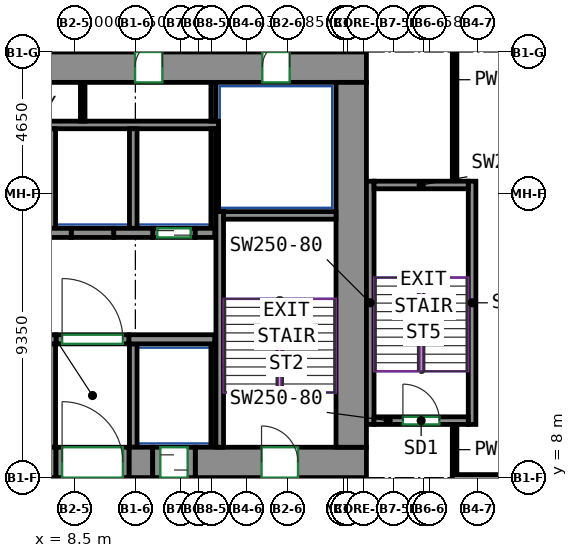
"""IFC4 building model, lengths in metres.
Left out: names, types, materials, properties, quantities, classifications, styles, units other than length and angle.
Written with IfcOpenShell. Run it as: python <this file> out.ifc"""

import sys

from ifc_helpers import new_model, si_unit, direction, frame, frame_2d, origin, place, context, subcontext, project, spatial, rectangle, extrude, source, transform, mapped, element, fill, save


model = new_model("IFC4")
c1 = context("Model", 3, precision=1e-05, world=origin(), true_north=direction((0.0, 1.0)))
c2 = subcontext(c1, "Body", "Model", "MODEL_VIEW")
j1 = project(units=[si_unit("LENGTHUNIT", "METRE"), si_unit("PLANEANGLEUNIT", "RADIAN")], contexts=[c1])
p1 = place(None, origin())
s1 = spatial("IfcSite", under=j1, at=p1, CompositionType="ELEMENT")
p2 = place(p1, origin())
s2 = spatial("IfcBuilding", under=s1, at=p2, CompositionType="ELEMENT")
p3 = place(p2, frame((0.0, 0.0, 27.0)))
s3 = spatial("IfcBuildingStorey", under=s2, at=p3, CompositionType="ELEMENT", Elevation=27.0)
m1 = source(origin(), c2, "Body", "SweptSolid", [
    extrude(rectangle(XDim=14.18, YDim=1.0, at=frame_2d((7.09, 0.0))), origin(), (0.0, 0.0, 1.0), 3.72),
])
p4 = place(p3, frame((-6.29, 8.5, 0.0), z_axis=(0.0, 0.0, 1.0), x_axis=(1.0, 0.0, 0.0)))
e1 = element("IfcWall", 1, at=p4, inside=s3, PredefinedType="SHEAR", context=c2, shape_type="MappedRepresentation", body=[
    mapped(m1, transform((0.0, 0.0, 0.0))),
])
m2 = source(origin(), c2, "Body", "SweptSolid", [
    extrude(rectangle(XDim=0.78, YDim=1.0, at=frame_2d((0.39, 0.0))), origin(), (0.0, 0.0, 1.0), 3.72),
])
p5 = place(p3, frame((10.29, 8.5, 0.0), z_axis=(0.0, 0.0, 1.0), x_axis=(1.0, 0.0, 0.0)))
e2 = element("IfcWall", 2, at=p5, inside=s3, PredefinedType="SHEAR", context=c2, shape_type="MappedRepresentation", body=[
    mapped(m2, transform((0.0, 0.0, 0.0))),
])
m3 = source(origin(), c2, "Body", "SweptSolid", [
    extrude(rectangle(XDim=5.63, YDim=1.0, at=frame_2d((2.815, 0.0))), origin(), (0.0, 0.0, 1.0), 3.72),
])
p6 = place(p3, frame((12.47, 8.5, 0.0), z_axis=(0.0, 0.0, 1.0), x_axis=(1.0, 0.0, 0.0)))
e3 = element("IfcWall", 3, at=p6, inside=s3, PredefinedType="SHEAR", context=c2, shape_type="MappedRepresentation", body=[
    mapped(m3, transform((0.0, 0.0, 0.0))),
])
p7 = place(p6, frame((2.18, 0.0, 0.0)))
e4 = element("IfcOpeningElement", 4, at=p7, cuts=e3, PredefinedType="OPENING", context=c2, shape_type="SweptSolid", body=[
    extrude(rectangle(XDim=1.2, YDim=2.1, at=frame_2d((0.6, 1.05))), frame((0.0, 0.51, 0.0), z_axis=(0.0, -1.0, 0.0), x_axis=(1.0, 0.0, 0.0)), (0.0, 0.0, 1.0), 1.02),
])
m4 = source(origin(), c2, "Body", "SweptSolid", [
    extrude(rectangle(XDim=34.1, YDim=1.0, at=frame_2d((17.05, 0.0))), origin(), (0.0, 0.0, 1.0), 3.72),
])
p8 = place(p3, frame((-16.0, 21.5, 0.0), z_axis=(0.0, 0.0, 1.0), x_axis=(1.0, 0.0, 0.0)))
e5 = element("IfcWall", 5, at=p8, inside=s3, PredefinedType="SHEAR", context=c2, shape_type="MappedRepresentation", body=[
    mapped(m4, transform((0.0, 0.0, 0.0))),
])
p9 = place(p8, frame((6.108, 0.0, 0.0)))
e6 = element("IfcOpeningElement", 6, at=p9, cuts=e5, PredefinedType="OPENING", context=c2, shape_type="SweptSolid", body=[
    extrude(rectangle(XDim=0.9, YDim=2.1, at=frame_2d((0.45, 1.05))), frame((0.0, 0.51, 0.0), z_axis=(0.0, -1.0, 0.0), x_axis=(1.0, 0.0, 0.0)), (0.0, 0.0, 1.0), 1.02),
])
p10 = place(p8, frame((11.173, 0.0, 0.0)))
e7 = element("IfcOpeningElement", 7, at=p10, cuts=e5, PredefinedType="OPENING", context=c2, shape_type="SweptSolid", body=[
    extrude(rectangle(XDim=0.9, YDim=2.1, at=frame_2d((0.45, 1.05))), frame((0.0, 0.51, 0.0), z_axis=(0.0, -1.0, 0.0), x_axis=(1.0, 0.0, 0.0)), (0.0, 0.0, 1.0), 1.02),
])
p11 = place(p8, frame((16.238, 0.0, 0.0)))
e8 = element("IfcOpeningElement", 8, at=p11, cuts=e5, PredefinedType="OPENING", context=c2, shape_type="SweptSolid", body=[
    extrude(rectangle(XDim=0.9, YDim=2.1, at=frame_2d((0.45, 1.05))), frame((0.0, 0.51, 0.0), z_axis=(0.0, -1.0, 0.0), x_axis=(1.0, 0.0, 0.0)), (0.0, 0.0, 1.0), 1.02),
])
p12 = place(p8, frame((21.062, 0.0, 0.0)))
e9 = element("IfcOpeningElement", 9, at=p12, cuts=e5, PredefinedType="OPENING", context=c2, shape_type="SweptSolid", body=[
    extrude(rectangle(XDim=0.9, YDim=2.1, at=frame_2d((0.45, 1.05))), frame((0.0, 0.51, 0.0), z_axis=(0.0, -1.0, 0.0), x_axis=(1.0, 0.0, 0.0)), (0.0, 0.0, 1.0), 1.02),
])
p13 = place(p8, frame((26.489, 0.0, 0.0)))
e10 = element("IfcOpeningElement", 10, at=p13, cuts=e5, PredefinedType="OPENING", context=c2, shape_type="SweptSolid", body=[
    extrude(rectangle(XDim=0.9, YDim=2.1, at=frame_2d((0.45, 1.05))), frame((0.0, 0.51, 0.0), z_axis=(0.0, -1.0, 0.0), x_axis=(1.0, 0.0, 0.0)), (0.0, 0.0, 1.0), 1.02),
])
p14 = place(p8, frame((2.525, 0.0, 0.0)))
e11 = element("IfcOpeningElement", 11, at=p14, cuts=e5, PredefinedType="OPENING", context=c2, shape_type="SweptSolid", body=[
    extrude(rectangle(XDim=0.9, YDim=2.1, at=frame_2d((0.45, 1.05))), frame((0.0, 0.51, 0.0), z_axis=(0.0, -1.0, 0.0), x_axis=(1.0, 0.0, 0.0)), (0.0, 0.0, 1.0), 1.02),
])
p15 = place(p8, frame((30.675, 0.0, 0.0)))
e12 = element("IfcOpeningElement", 12, at=p15, cuts=e5, PredefinedType="OPENING", context=c2, shape_type="SweptSolid", body=[
    extrude(rectangle(XDim=0.9, YDim=2.1, at=frame_2d((0.45, 1.05))), frame((0.0, 0.51, 0.0), z_axis=(0.0, -1.0, 0.0), x_axis=(1.0, 0.0, 0.0)), (0.0, 0.0, 1.0), 1.02),
])
m5 = source(origin(), c2, "Body", "SweptSolid", [
    extrude(rectangle(XDim=12.0, YDim=1.0, at=frame_2d((6.0, 0.0))), origin(), (0.0, 0.0, 1.0), 3.72),
])
p16 = place(p3, frame((17.6, 9.0, 0.0), z_axis=(0.0, 0.0, 1.0), x_axis=(0.0, 1.0, 0.0)))
e13 = element("IfcWall", 13, at=p16, inside=s3, PredefinedType="SHEAR", context=c2, shape_type="MappedRepresentation", body=[
    mapped(m5, transform((0.0, 0.0, 0.0))),
])
m6 = source(origin(), c2, "Body", "SweptSolid", [
    extrude(rectangle(XDim=7.75, YDim=0.25, at=frame_2d((3.875, 0.0))), origin(), (0.0, 0.0, 1.0), 3.72),
])
p17 = place(p3, frame((13.275, 9.0, 0.0), z_axis=(0.0, 0.0, 1.0), x_axis=(0.0, 1.0, 0.0)))
e14 = element("IfcWall", 14, at=p17, inside=s3, PredefinedType="SHEAR", context=c2, shape_type="MappedRepresentation", body=[
    mapped(m6, transform((0.0, 0.0, 0.0))),
])
m7 = source(origin(), c2, "Body", "SweptSolid", [
    extrude(rectangle(XDim=3.7, YDim=0.25, at=frame_2d((1.85, 0.0))), origin(), (0.0, 0.0, 1.0), 3.72),
])
p18 = place(p3, frame((13.4, 16.625, 0.0), z_axis=(0.0, 0.0, 1.0), x_axis=(1.0, 0.0, 0.0)))
e15 = element("IfcWall", 15, at=p18, inside=s3, PredefinedType="SHEAR", context=c2, shape_type="MappedRepresentation", body=[
    mapped(m7, transform((0.0, 0.0, 0.0))),
])
m8 = source(origin(), c2, "Body", "SweptSolid", [
    extrude(rectangle(XDim=8.0, YDim=0.25, at=frame_2d((4.0, 0.0))), origin(), (0.0, 0.0, 1.0), 3.72),
])
for number, where, z_axis, x_axis in (
    (16, (18.225, 9.75, 0.0), (0.0, 0.0, 1.0), (0.0, 1.0, 0.0)),
    (17, (21.575, 9.75, 0.0), (0.0, 0.0, 1.0), (0.0, 1.0, 0.0)),
):
    element("IfcWall", number, at=place(p3, frame(where, z_axis=z_axis, x_axis=x_axis)), inside=s3, PredefinedType="SHEAR", context=c2, shape_type="MappedRepresentation", body=[
        mapped(m8, transform((0.0, 0.0, 0.0))),
    ])
m9 = source(origin(), c2, "Body", "SweptSolid", [
    extrude(rectangle(XDim=3.1, YDim=0.25, at=frame_2d((1.55, 0.0))), origin(), (0.0, 0.0, 1.0), 3.72),
])
p19 = place(p3, frame((18.35, 9.875, 0.0), z_axis=(0.0, 0.0, 1.0), x_axis=(1.0, 0.0, 0.0)))
e18 = element("IfcWall", 18, at=p19, inside=s3, PredefinedType="SHEAR", context=c2, shape_type="MappedRepresentation", body=[
    mapped(m9, transform((0.0, 0.0, 0.0))),
])
p20 = place(p19, frame((0.95, 0.0, 0.0)))
e19 = element("IfcOpeningElement", 19, at=p20, cuts=e18, PredefinedType="OPENING", context=c2, shape_type="SweptSolid", body=[
    extrude(rectangle(XDim=1.2, YDim=2.1, at=frame_2d((0.6, 1.05))), frame((0.0, 0.135, 0.0), z_axis=(0.0, -1.0, 0.0), x_axis=(1.0, 0.0, 0.0)), (0.0, 0.0, 1.0), 0.27),
])
p21 = place(p3, frame((18.35, 17.625, 0.0), z_axis=(0.0, 0.0, 1.0), x_axis=(1.0, 0.0, 0.0)))
e20 = element("IfcWall", 20, at=p21, inside=s3, PredefinedType="SHEAR", context=c2, shape_type="MappedRepresentation", body=[
    mapped(m9, transform((0.0, 0.0, 0.0))),
])
m10 = source(origin(), c2, "Body", "SweptSolid", [
    extrude(rectangle(XDim=0.78, YDim=0.3, at=frame_2d((0.39, 0.0))), origin(), (0.0, 0.0, 1.0), 3.72),
])
p22 = place(p3, frame((7.11, 12.55, 0.0), z_axis=(0.0, 0.0, 1.0), x_axis=(1.0, 0.0, 0.0)))
e21 = element("IfcWall", 21, at=p22, inside=s3, PredefinedType="SHEAR", context=c2, shape_type="MappedRepresentation", body=[
    mapped(m10, transform((0.0, 0.0, 0.0))),
])
m11 = source(origin(), c2, "Body", "SweptSolid", [
    extrude(rectangle(XDim=2.82, YDim=0.3, at=frame_2d((1.41, 0.0))), origin(), (0.0, 0.0, 1.0), 3.72),
])
p23 = place(p3, frame((10.29, 12.55, 0.0), z_axis=(0.0, 0.0, 1.0), x_axis=(1.0, 0.0, 0.0)))
e22 = element("IfcWall", 22, at=p23, inside=s3, PredefinedType="SHEAR", context=c2, shape_type="MappedRepresentation", body=[
    mapped(m11, transform((0.0, 0.0, 0.0))),
])
m12 = source(origin(), c2, "Body", "SweptSolid", [
    extrude(rectangle(XDim=1.28, YDim=0.3, at=frame_2d((0.64, 0.0))), origin(), (0.0, 0.0, 1.0), 3.72),
])
p24 = place(p3, frame((7.11, 16.05, 0.0), z_axis=(0.0, 0.0, 1.0), x_axis=(1.0, 0.0, 0.0)))
e23 = element("IfcWall", 23, at=p24, inside=s3, PredefinedType="SHEAR", context=c2, shape_type="MappedRepresentation", body=[
    mapped(m12, transform((0.0, 0.0, 0.0))),
])
m13 = source(origin(), c2, "Body", "SweptSolid", [
    extrude(rectangle(XDim=1.28, YDim=0.3, at=frame_2d((0.64, 0.0))), origin(), (0.0, 0.0, 1.0), 3.72),
])
p25 = place(p3, frame((9.79, 16.05, 0.0), z_axis=(0.0, 0.0, 1.0), x_axis=(1.0, 0.0, 0.0)))
e24 = element("IfcWall", 24, at=p25, inside=s3, PredefinedType="SHEAR", context=c2, shape_type="MappedRepresentation", body=[
    mapped(m13, transform((0.0, 0.0, 0.0))),
])
m14 = source(origin(), c2, "Body", "SweptSolid", [
    extrude(rectangle(XDim=0.64, YDim=0.3, at=frame_2d((0.32, 0.0))), origin(), (0.0, 0.0, 1.0), 3.72),
])
p26 = place(p3, frame((12.47, 16.05, 0.0), z_axis=(0.0, 0.0, 1.0), x_axis=(1.0, 0.0, 0.0)))
e25 = element("IfcWall", 25, at=p26, inside=s3, PredefinedType="SHEAR", context=c2, shape_type="MappedRepresentation", body=[
    mapped(m14, transform((0.0, 0.0, 0.0))),
])
m15 = source(origin(), c2, "Body", "SweptSolid", [
    extrude(rectangle(XDim=1.4, YDim=0.3, at=frame_2d((0.7, 0.0))), origin(), (0.0, 0.0, 1.0), 3.72),
])
p27 = place(p3, frame((11.07, 16.05, 0.0), z_axis=(0.0, 0.0, 1.0), x_axis=(1.0, 0.0, 0.0)))
e26 = element("IfcWall", 26, at=p27, inside=s3, PredefinedType="PARTITIONING", context=c2, shape_type="MappedRepresentation", body=[
    mapped(m15, transform((0.0, 0.0, 0.0))),
])
p28 = place(p27, frame((0.15, 0.0, 0.0)))
e27 = element("IfcOpeningElement", 27, at=p28, cuts=e26, PredefinedType="OPENING", context=c2, shape_type="SweptSolid", body=[
    extrude(rectangle(XDim=1.1, YDim=2.1, at=frame_2d((0.55, 1.05))), frame((0.0, 0.16, 0.0), z_axis=(0.0, -1.0, 0.0), x_axis=(1.0, 0.0, 0.0)), (0.0, 0.0, 1.0), 0.32),
])
m16 = source(origin(), c2, "Body", "SweptSolid", [
    extrude(rectangle(XDim=2.4, YDim=0.3, at=frame_2d((1.2, 0.0))), origin(), (0.0, 0.0, 1.0), 3.72),
])
p29 = place(p3, frame((7.89, 12.55, 0.0), z_axis=(0.0, 0.0, 1.0), x_axis=(1.0, 0.0, 0.0)))
e28 = element("IfcWall", 28, at=p29, inside=s3, PredefinedType="PARTITIONING", context=c2, shape_type="MappedRepresentation", body=[
    mapped(m16, transform((0.0, 0.0, 0.0))),
])
p30 = place(p29, frame((0.2, 0.0, 0.0)))
e29 = element("IfcOpeningElement", 29, at=p30, cuts=e28, PredefinedType="OPENING", context=c2, shape_type="SweptSolid", body=[
    extrude(rectangle(XDim=2.0, YDim=2.1, at=frame_2d((1.0, 1.05))), frame((0.0, 0.16, 0.0), z_axis=(0.0, -1.0, 0.0), x_axis=(1.0, 0.0, 0.0)), (0.0, 0.0, 1.0), 0.32),
])
m17 = source(origin(), c2, "Body", "SweptSolid", [
    extrude(rectangle(XDim=1.4, YDim=0.3, at=frame_2d((0.7, 0.0))), origin(), (0.0, 0.0, 1.0), 3.72),
])
p31 = place(p3, frame((8.39, 16.05, 0.0), z_axis=(0.0, 0.0, 1.0), x_axis=(1.0, 0.0, 0.0)))
e30 = element("IfcWall", 30, at=p31, inside=s3, PredefinedType="PARTITIONING", context=c2, shape_type="MappedRepresentation", body=[
    mapped(m17, transform((0.0, 0.0, 0.0))),
])
m18 = source(origin(), c2, "Body", "SweptSolid", [
    extrude(rectangle(XDim=24.37, YDim=0.25, at=frame_2d((12.185, 0.0))), origin(), (0.0, 0.0, 1.0), 3.72),
])
p32 = place(p3, frame((-11.135, 19.6, 0.0), z_axis=(0.0, 0.0, 1.0), x_axis=(1.0, 0.0, 0.0)))
e31 = element("IfcWall", 31, at=p32, inside=s3, PredefinedType="PARTITIONING", context=c2, shape_type="MappedRepresentation", body=[
    mapped(m18, transform((0.0, 0.0, 0.0))),
])
m19 = source(origin(), c2, "Body", "SweptSolid", [
    extrude(rectangle(XDim=3.275, YDim=0.165, at=frame_2d((1.638, 0.0))), origin(), (0.0, 0.0, 1.0), 3.72),
])
p33 = place(p3, frame((13.067, 16.2, 0.0), z_axis=(0.0, 0.0, 1.0), x_axis=(0.0, 1.0, 0.0)))
e32 = element("IfcWall", 32, at=p33, inside=s3, PredefinedType="PARTITIONING", context=c2, shape_type="MappedRepresentation", body=[
    mapped(m19, transform((0.0, 0.0, 0.0))),
])
m20 = source(origin(), c2, "Body", "SweptSolid", [
    extrude(rectangle(XDim=1.275, YDim=0.165, at=frame_2d((0.637, 0.0))), origin(), (0.0, 0.0, 1.0), 3.72),
])
p34 = place(p3, frame((13.067, 19.725, 0.0), z_axis=(0.0, 0.0, 1.0), x_axis=(0.0, 1.0, 0.0)))
e33 = element("IfcWall", 33, at=p34, inside=s3, PredefinedType="PARTITIONING", context=c2, shape_type="MappedRepresentation", body=[
    mapped(m20, transform((0.0, 0.0, 0.0))),
])
m21 = source(origin(), c2, "Body", "SweptSolid", [
    extrude(rectangle(XDim=3.275, YDim=0.25, at=frame_2d((1.638, 0.0))), origin(), (0.0, 0.0, 1.0), 3.72),
])
p35 = place(p3, frame((10.43, 16.2, 0.0), z_axis=(0.0, 0.0, 1.0), x_axis=(0.0, 1.0, 0.0)))
e34 = element("IfcWall", 34, at=p35, inside=s3, PredefinedType="PARTITIONING", context=c2, shape_type="MappedRepresentation", body=[
    mapped(m21, transform((0.0, 0.0, 0.0))),
])
m22 = source(origin(), c2, "Body", "SweptSolid", [
    extrude(rectangle(XDim=2.725, YDim=0.085, at=frame_2d((1.363, 0.0))), origin(), (0.0, 0.0, 1.0), 3.72),
])
p36 = place(p3, frame((13.192, 16.75, 0.0), z_axis=(0.0, 0.0, 1.0), x_axis=(0.0, 1.0, 0.0)))
e35 = element("IfcWall", 35, at=p36, inside=s3, PredefinedType="PARTITIONING", context=c2, shape_type="MappedRepresentation", body=[
    mapped(m22, transform((0.0, 0.0, 0.0))),
])
p37 = place(p3, frame((7.75, 16.2, 0.0), z_axis=(0.0, 0.0, 1.0), x_axis=(0.0, 1.0, 0.0)))
e36 = element("IfcWall", 36, at=p37, inside=s3, PredefinedType="PARTITIONING", context=c2, shape_type="MappedRepresentation", body=[
    mapped(m21, transform((0.0, 0.0, 0.0))),
])
m23 = source(origin(), c2, "Body", "SweptSolid", [
    extrude(rectangle(XDim=3.4, YDim=0.25, at=frame_2d((1.7, 0.0))), origin(), (0.0, 0.0, 1.0), 3.72),
])
p38 = place(p3, frame((10.43, 9.0, 0.0), z_axis=(0.0, 0.0, 1.0), x_axis=(0.0, 1.0, 0.0)))
e37 = element("IfcWall", 37, at=p38, inside=s3, PredefinedType="PARTITIONING", context=c2, shape_type="MappedRepresentation", body=[
    mapped(m23, transform((0.0, 0.0, 0.0))),
])
m24 = source(origin(), c2, "Body", "SweptSolid", [
    extrude(rectangle(XDim=3.4, YDim=0.165, at=frame_2d((1.7, 0.0))), origin(), (0.0, 0.0, 1.0), 3.72),
])
p39 = place(p3, frame((13.067, 9.0, 0.0), z_axis=(0.0, 0.0, 1.0), x_axis=(0.0, 1.0, 0.0)))
e38 = element("IfcWall", 38, at=p39, inside=s3, PredefinedType="PARTITIONING", context=c2, shape_type="MappedRepresentation", body=[
    mapped(m24, transform((0.0, 0.0, 0.0))),
])
p40 = place(p3, frame((7.75, 9.0, 0.0), z_axis=(0.0, 0.0, 1.0), x_axis=(0.0, 1.0, 0.0)))
e39 = element("IfcWall", 39, at=p40, inside=s3, PredefinedType="PARTITIONING", context=c2, shape_type="MappedRepresentation", body=[
    mapped(m23, transform((0.0, 0.0, 0.0))),
])
m25 = source(origin(), c2, "Body", "SweptSolid", [
    extrude(rectangle(XDim=1.275, YDim=0.15, at=frame_2d((0.637, 0.0))), origin(), (0.0, 0.0, 1.0), 3.72),
])
p41 = place(p3, frame((8.768, 19.725, 0.0), z_axis=(0.0, 0.0, 1.0), x_axis=(0.0, 1.0, 0.0)))
e40 = element("IfcWall", 40, at=p41, inside=s3, PredefinedType="PARTITIONING", context=c2, shape_type="MappedRepresentation", body=[
    mapped(m25, transform((0.0, 0.0, 0.0))),
])
m26 = source(origin(), c2, "Body", "SweptSolid", [
    extrude(rectangle(XDim=2.4, YDim=1.0, at=frame_2d((1.2, 0.0))), origin(), (0.0, 0.0, 1.0), 2.7),
])
p42 = place(p3, frame((7.89, 8.5, 0.0), z_axis=(0.0, 0.0, 1.0), x_axis=(1.0, 0.0, 0.0)))
e41 = element("IfcWall", 41, at=p42, inside=s3, PredefinedType="PARTITIONING", context=c2, shape_type="MappedRepresentation", body=[
    mapped(m26, transform((0.0, 0.0, 0.0))),
])
p43 = place(p42, frame((0.2, 0.0, 0.0)))
e42 = element("IfcOpeningElement", 42, at=p43, cuts=e41, PredefinedType="OPENING", context=c2, shape_type="SweptSolid", body=[
    extrude(rectangle(XDim=2.0, YDim=2.1, at=frame_2d((1.0, 1.05))), frame((0.0, 0.51, 0.0), z_axis=(0.0, -1.0, 0.0), x_axis=(1.0, 0.0, 0.0)), (0.0, 0.0, 1.0), 1.02),
])
m27 = source(origin(), c2, "Body", "SweptSolid", [
    extrude(rectangle(XDim=1.4, YDim=1.0, at=frame_2d((0.7, 0.0))), origin(), (0.0, 0.0, 1.0), 2.7),
])
p44 = place(p3, frame((11.07, 8.5, 0.0), z_axis=(0.0, 0.0, 1.0), x_axis=(1.0, 0.0, 0.0)))
e43 = element("IfcWall", 43, at=p44, inside=s3, PredefinedType="PARTITIONING", context=c2, shape_type="MappedRepresentation", body=[
    mapped(m27, transform((0.0, 0.0, 0.0))),
])
p45 = place(p44, frame((0.25, 0.0, 0.0)))
e44 = element("IfcOpeningElement", 44, at=p45, cuts=e43, PredefinedType="OPENING", context=c2, shape_type="SweptSolid", body=[
    extrude(rectangle(XDim=0.9, YDim=2.1, at=frame_2d((0.45, 1.05))), frame((0.0, 0.51, 0.0), z_axis=(0.0, -1.0, 0.0), x_axis=(1.0, 0.0, 0.0)), (0.0, 0.0, 1.0), 1.02),
])
p46 = place(p3, frame((21.0, 17.75, 0.0), z_axis=(0.0, 0.0, 1.0), x_axis=(0.0, 1.0, 0.0)))
e45 = element("IfcWall", 45, at=p46, inside=s3, PredefinedType="PARTITIONING", context=c2, shape_type="SweptSolid", body=[
    extrude(rectangle(XDim=6.675, YDim=0.15, at=frame_2d((3.337, 0.0))), origin(), (0.0, 0.0, 1.0), 3.72),
])
p47 = place(p3, frame((21.0, 8.09, 0.0), z_axis=(0.0, 0.0, 1.0), x_axis=(0.0, 1.0, 0.0)))
e46 = element("IfcWall", 46, at=p47, inside=s3, PredefinedType="PARTITIONING", context=c2, shape_type="SweptSolid", body=[
    extrude(rectangle(XDim=1.66, YDim=0.15, at=frame_2d((0.83, 0.0))), origin(), (0.0, 0.0, 1.0), 3.72),
])
p48 = place(p3, frame((20.926, 8.0, 0.0), z_axis=(0.0, 0.0, 1.0), x_axis=(1.0, 0.0, 0.0)))
e47 = element("IfcWall", 47, at=p48, inside=s3, PredefinedType="PARTITIONING", context=c2, shape_type="SweptSolid", body=[
    extrude(rectangle(XDim=6.174, YDim=0.2, at=frame_2d((3.087, 0.0))), origin(), (0.0, 0.0, 1.0), 3.72),
])
p49 = place(p30, origin())
e48 = element("IfcDoor", 48, at=p49, inside=s3, OperationType="DOUBLE_DOOR_SINGLE_SWING", PredefinedType="DOOR", context=c2, shape_type="SweptSolid", body=[
    extrude(rectangle(XDim=2.0, YDim=2.1, at=frame_2d((1.0, 1.05))), frame((0.0, 0.025, 0.0), z_axis=(0.0, -1.0, 0.0), x_axis=(1.0, 0.0, 0.0)), (0.0, 0.0, 1.0), 0.05),
])
fill(e29, e48)
p50 = place(p43, origin())
e49 = element("IfcDoor", 49, at=p50, inside=s3, OperationType="DOUBLE_DOOR_SINGLE_SWING", PredefinedType="DOOR", context=c2, shape_type="SweptSolid", body=[
    extrude(rectangle(XDim=2.0, YDim=2.1, at=frame_2d((1.0, 1.05))), frame((0.0, 0.405, 0.0), z_axis=(0.0, -1.0, 0.0), x_axis=(1.0, 0.0, 0.0)), (0.0, 0.0, 1.0), 0.05),
])
fill(e42, e49)
p51 = place(p45, origin())
e50 = element("IfcDoor", 50, at=p51, inside=s3, OperationType="SLIDING_TO_LEFT", PredefinedType="DOOR", context=c2, shape_type="SweptSolid", body=[
    extrude(rectangle(XDim=0.9, YDim=2.1, at=frame_2d((0.45, 1.05))), frame((0.0, 0.405, 0.0), z_axis=(0.0, -1.0, 0.0), x_axis=(1.0, 0.0, 0.0)), (0.0, 0.0, 1.0), 0.05),
])
fill(e44, e50)
p52 = place(p28, origin())
e51 = element("IfcDoor", 51, at=p52, inside=s3, OperationType="DOUBLE_DOOR_SLIDING", PredefinedType="DOOR", context=c2, shape_type="SweptSolid", body=[
    extrude(rectangle(XDim=1.1, YDim=2.1, at=frame_2d((0.55, 1.05))), frame((0.0, 0.025, 0.0), z_axis=(0.0, -1.0, 0.0), x_axis=(1.0, 0.0, 0.0)), (0.0, 0.0, 1.0), 0.05),
])
fill(e27, e51)
p53 = place(p13, origin())
e52 = element("IfcDoor", 52, at=p53, inside=s3, OperationType="SINGLE_SWING_RIGHT", PredefinedType="DOOR", context=c2, shape_type="SweptSolid", body=[
    extrude(rectangle(XDim=0.9, YDim=2.1, at=frame_2d((0.45, 1.05))), frame((0.0, -0.355, 0.0), z_axis=(0.0, -1.0, 0.0), x_axis=(1.0, 0.0, 0.0)), (0.0, 0.0, 1.0), 0.05),
])
fill(e10, e52)
p54 = place(p15, origin())
e53 = element("IfcDoor", 53, at=p54, inside=s3, OperationType="SINGLE_SWING_RIGHT", PredefinedType="DOOR", context=c2, shape_type="SweptSolid", body=[
    extrude(rectangle(XDim=0.9, YDim=2.1, at=frame_2d((0.45, 1.05))), frame((0.0, -0.355, 0.0), z_axis=(0.0, -1.0, 0.0), x_axis=(1.0, 0.0, 0.0)), (0.0, 0.0, 1.0), 0.05),
])
fill(e12, e53)
p55 = place(p7, origin())
e54 = element("IfcDoor", 54, at=p55, inside=s3, OperationType="DOUBLE_DOOR_SINGLE_SWING", PredefinedType="DOOR", context=c2, shape_type="SweptSolid", body=[
    extrude(rectangle(XDim=1.2, YDim=2.1, at=frame_2d((0.6, 1.05))), frame((0.0, 0.405, 0.0), z_axis=(0.0, -1.0, 0.0), x_axis=(1.0, 0.0, 0.0)), (0.0, 0.0, 1.0), 0.05),
])
fill(e4, e54)
p56 = place(p20, origin())
e55 = element("IfcDoor", 55, at=p56, inside=s3, OperationType="DOUBLE_DOOR_SINGLE_SWING", PredefinedType="DOOR", context=c2, shape_type="SweptSolid", body=[
    extrude(rectangle(XDim=1.2, YDim=2.1, at=frame_2d((0.6, 1.05))), frame((0.0, 0.025, 0.0), z_axis=(0.0, -1.0, 0.0), x_axis=(1.0, 0.0, 0.0)), (0.0, 0.0, 1.0), 0.05),
])
fill(e19, e55)
save(model, sys.argv[1])
